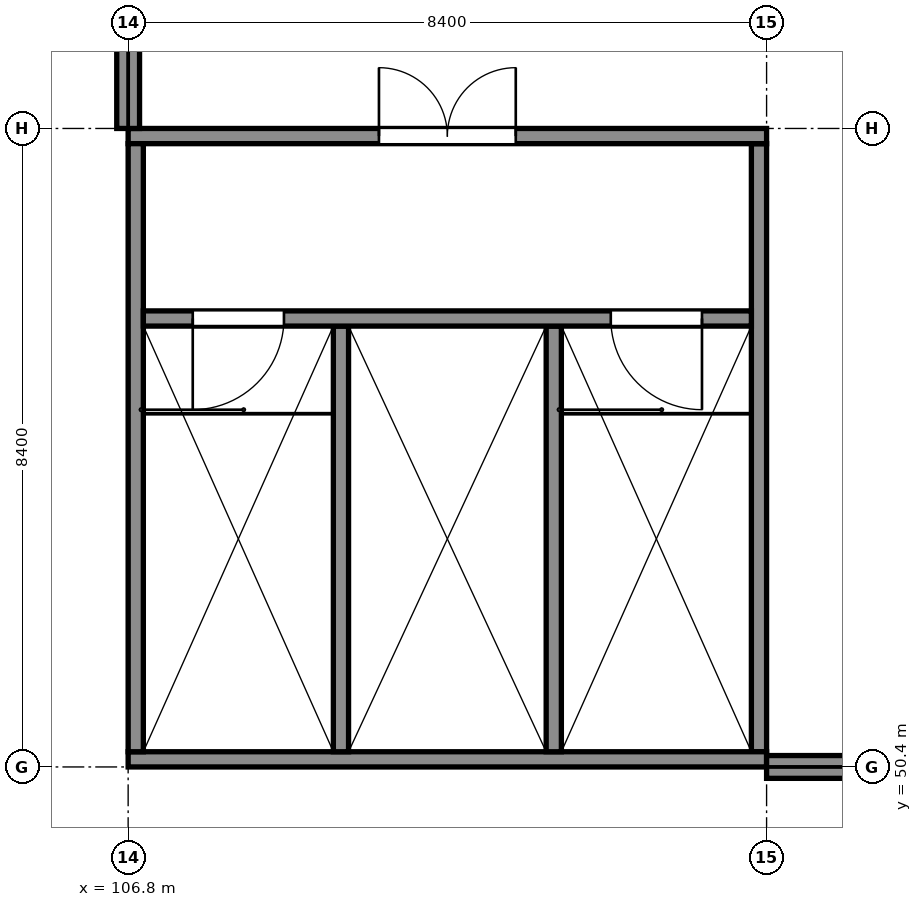
"""IFC4 building model, lengths in metres.
Left out: names, types, materials, properties, quantities, classifications, styles, units other than length and angle.
Written with IfcOpenShell. Run it as: python <this file> out.ifc"""

import sys

from ifc_helpers import new_model, si_unit, direction, frame, frame_2d, origin, place, context, subcontext, project, spatial, polyline, rectangle, outline, extrude, element, fill, save


model = new_model("IFC4")
c1 = context("Model", 3, precision=1e-05, world=origin(), true_north=direction((0.0, 1.0)))
c2 = subcontext(c1, "Body", "Model", "MODEL_VIEW")
j1 = project(units=[si_unit("LENGTHUNIT", "METRE"), si_unit("PLANEANGLEUNIT", "RADIAN")], contexts=[c1])
p1 = place(None, origin())
s1 = spatial("IfcSite", under=j1, at=p1, CompositionType="ELEMENT")
p2 = place(p1, origin())
s2 = spatial("IfcBuilding", under=s1, at=p2, CompositionType="ELEMENT")
p3 = place(p2, frame((0.0, 0.0, 25.0)))
s3 = spatial("IfcBuildingStorey", under=s2, at=p3, CompositionType="ELEMENT", Elevation=25.0)
p4 = place(p3, frame((106.8, 50.5, 0.0), z_axis=(0.0, 0.0, 1.0), x_axis=(1.0, 0.0, 0.0)))
e1 = element("IfcWall", 1, at=p4, inside=s3, PredefinedType="SHEAR", context=c2, shape_type="SweptSolid", body=[
    extrude(rectangle(XDim=8.4, YDim=0.2, at=frame_2d((4.2, 0.0))), origin(), (0.0, 0.0, 1.0), 14.47),
])
p5 = place(p3, frame((106.8, 58.7, 0.0), z_axis=(0.0, 0.0, 1.0), x_axis=(1.0, 0.0, 0.0)))
e2 = element("IfcWall", 2, at=p5, inside=s3, PredefinedType="SHEAR", context=c2, shape_type="SweptSolid", body=[
    extrude(rectangle(XDim=8.4, YDim=0.2, at=frame_2d((4.2, 0.0))), origin(), (0.0, 0.0, 1.0), 14.47),
])
p6 = place(p5, frame((3.3, 0.0, 0.0)))
e3 = element("IfcOpeningElement", 3, at=p6, cuts=e2, PredefinedType="OPENING", context=c2, shape_type="SweptSolid", body=[
    extrude(rectangle(XDim=1.8, YDim=2.1, at=frame_2d((0.9, 1.05))), frame((0.0, 0.11, 0.0), z_axis=(0.0, -1.0, 0.0), x_axis=(1.0, 0.0, 0.0)), (0.0, 0.0, 1.0), 0.22),
])
for number, where, z_axis, x_axis in (
    (4, (106.9, 50.6, 0.0), (0.0, 0.0, 1.0), (0.0, 1.0, 0.0)),
    (5, (115.1, 50.6, 0.0), (0.0, 0.0, 1.0), (0.0, 1.0, 0.0)),
):
    element("IfcWall", number, at=place(p3, frame(where, z_axis=z_axis, x_axis=x_axis)), inside=s3, PredefinedType="SHEAR", context=c2, shape_type="SweptSolid", body=[
        extrude(rectangle(XDim=8.0, YDim=0.2, at=frame_2d((4.0, 0.0))), origin(), (0.0, 0.0, 1.0), 14.47),
    ])
p7 = place(p3, frame((107.0, 56.3, 0.0), z_axis=(0.0, 0.0, 1.0), x_axis=(1.0, 0.0, 0.0)))
e6 = element("IfcWall", 6, at=p7, inside=s3, PredefinedType="SHEAR", context=c2, shape_type="SweptSolid", body=[
    extrude(rectangle(XDim=8.0, YDim=0.2, at=frame_2d((4.0, 0.0))), origin(), (0.0, 0.0, 1.0), 14.47),
])
p8 = place(p7, frame((0.65, 0.0, 0.0)))
e7 = element("IfcOpeningElement", 7, at=p8, cuts=e6, PredefinedType="OPENING", context=c2, shape_type="SweptSolid", body=[
    extrude(rectangle(XDim=1.2, YDim=2.1, at=frame_2d((0.6, 1.05))), frame((0.0, 0.11, 0.0), z_axis=(0.0, -1.0, 0.0), x_axis=(1.0, 0.0, 0.0)), (0.0, 0.0, 1.0), 0.22),
])
p9 = place(p7, frame((6.15, 0.0, 0.0)))
e8 = element("IfcOpeningElement", 8, at=p9, cuts=e6, PredefinedType="OPENING", context=c2, shape_type="SweptSolid", body=[
    extrude(rectangle(XDim=1.2, YDim=2.1, at=frame_2d((0.6, 1.05))), frame((0.0, 0.11, 0.0), z_axis=(0.0, -1.0, 0.0), x_axis=(1.0, 0.0, 0.0)), (0.0, 0.0, 1.0), 0.22),
])
for number, where, z_axis, x_axis in (
    (9, (109.6, 50.6, 0.0), (0.0, 0.0, 1.0), (0.0, 1.0, 0.0)),
    (10, (112.4, 50.6, 0.0), (0.0, 0.0, 1.0), (0.0, 1.0, 0.0)),
):
    element("IfcWall", number, at=place(p3, frame(where, z_axis=z_axis, x_axis=x_axis)), inside=s3, PredefinedType="SHEAR", context=c2, shape_type="SweptSolid", body=[
        extrude(rectangle(XDim=5.6, YDim=0.2, at=frame_2d((2.8, 0.0))), origin(), (0.0, 0.0, 1.0), 14.47),
    ])
p10 = place(p3, frame((115.2, 50.4, 0.0), z_axis=(0.0, 0.0, 1.0), x_axis=(1.0, 0.0, 0.0)))
e11 = element("IfcWall", 11, at=p10, inside=s3, PredefinedType="SOLIDWALL", context=c2, shape_type="SweptSolid", body=[
    extrude(rectangle(XDim=8.1, YDim=0.3, at=frame_2d((4.05, 0.0))), origin(), (0.0, 0.0, 1.0), 10.996),
])
p11 = place(p10, frame((2.35, 0.0, 1.5)))
e12 = element("IfcOpeningElement", 12, at=p11, cuts=e11, PredefinedType="OPENING", context=c2, shape_type="SweptSolid", body=[
    extrude(rectangle(XDim=0.6, YDim=2.4, at=frame_2d((0.3, 1.2))), frame((0.0, 0.16, 0.0), z_axis=(0.0, -1.0, 0.0), x_axis=(1.0, 0.0, 0.0)), (0.0, 0.0, 1.0), 0.32),
])
p12 = place(p10, frame((5.15, 0.0, 1.5)))
e13 = element("IfcOpeningElement", 13, at=p12, cuts=e11, PredefinedType="OPENING", context=c2, shape_type="SweptSolid", body=[
    extrude(rectangle(XDim=0.6, YDim=2.4, at=frame_2d((0.3, 1.2))), frame((0.0, 0.16, 0.0), z_axis=(0.0, -1.0, 0.0), x_axis=(1.0, 0.0, 0.0)), (0.0, 0.0, 1.0), 0.32),
])
p13 = place(p3, frame((106.8, 58.8, 0.0), z_axis=(0.0, 0.0, 1.0), x_axis=(0.0, 1.0, 0.0)))
e14 = element("IfcWall", 14, at=p13, inside=s3, PredefinedType="SOLIDWALL", context=c2, shape_type="SweptSolid", body=[
    extrude(outline(polyline([(0.0, 0.0), (8.4, 0.0), (8.4, 13.06), (0.0, 12.361), (0.0, 0.0)])), frame((0.0, 0.15, 0.0), z_axis=(0.0, -1.0, 0.0), x_axis=(1.0, 0.0, 0.0)), (0.0, 0.0, 1.0), 0.3),
])
p14 = place(p13, frame((2.5, 0.0, 1.5)))
e15 = element("IfcOpeningElement", 15, at=p14, cuts=e14, PredefinedType="OPENING", context=c2, shape_type="SweptSolid", body=[
    extrude(rectangle(XDim=0.6, YDim=2.4, at=frame_2d((0.3, 1.2))), frame((0.0, 0.16, 0.0), z_axis=(0.0, -1.0, 0.0), x_axis=(1.0, 0.0, 0.0)), (0.0, 0.0, 1.0), 0.32),
])
p15 = place(p13, frame((5.3, 0.0, 1.5)))
e16 = element("IfcOpeningElement", 16, at=p15, cuts=e14, PredefinedType="OPENING", context=c2, shape_type="SweptSolid", body=[
    extrude(rectangle(XDim=0.6, YDim=2.4, at=frame_2d((0.3, 1.2))), frame((0.0, 0.16, 0.0), z_axis=(0.0, -1.0, 0.0), x_axis=(1.0, 0.0, 0.0)), (0.0, 0.0, 1.0), 0.32),
])
p16 = place(p6, origin())
e17 = element("IfcDoor", 17, at=p16, inside=s3, OperationType="DOUBLE_DOOR_SINGLE_SWING", PredefinedType="DOOR", context=c2, shape_type="SweptSolid", body=[
    extrude(rectangle(XDim=1.8, YDim=2.1, at=frame_2d((0.9, 1.05))), frame((0.0, 0.025, 0.0), z_axis=(0.0, -1.0, 0.0), x_axis=(1.0, 0.0, 0.0)), (0.0, 0.0, 1.0), 0.05),
])
fill(e3, e17)
p17 = place(p8, origin())
e18 = element("IfcDoor", 18, at=p17, inside=s3, OperationType="SINGLE_SWING_LEFT", PredefinedType="DOOR", context=c2, shape_type="SweptSolid", body=[
    extrude(rectangle(XDim=1.2, YDim=2.1, at=frame_2d((0.6, 1.05))), frame((0.0, 0.025, 0.0), z_axis=(0.0, -1.0, 0.0), x_axis=(1.0, 0.0, 0.0)), (0.0, 0.0, 1.0), 0.05),
])
fill(e7, e18)
p18 = place(p9, origin())
e19 = element("IfcDoor", 19, at=p18, inside=s3, OperationType="SINGLE_SWING_RIGHT", PredefinedType="DOOR", context=c2, shape_type="SweptSolid", body=[
    extrude(rectangle(XDim=1.2, YDim=2.1, at=frame_2d((0.6, 1.05))), frame((0.0, 0.025, 0.0), z_axis=(0.0, -1.0, 0.0), x_axis=(1.0, 0.0, 0.0)), (0.0, 0.0, 1.0), 0.05),
])
fill(e8, e19)
save(model, sys.argv[1])
